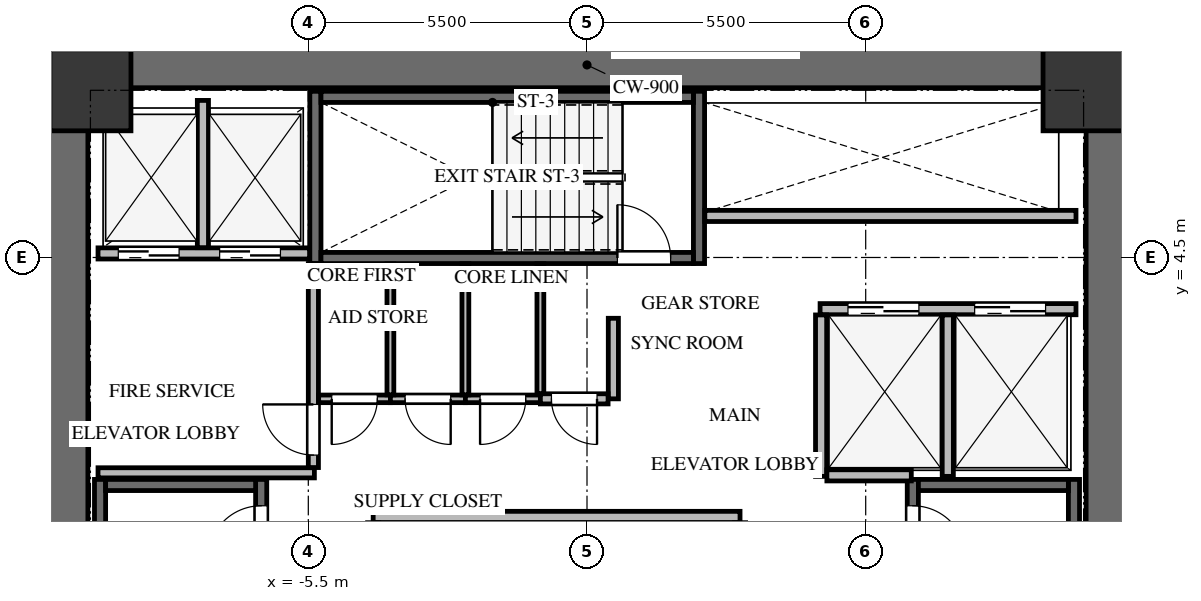
"""IFC4 building model, lengths in metres.
Left out: names, types, materials, properties, quantities, classifications, styles, units other than length and angle.
Written with IfcOpenShell. Run it as: python <this file> out.ifc"""

import sys

from ifc_helpers import new_model, si_unit, direction, frame, frame_2d, origin, origin_2d, place, context, subcontext, project, spatial, rectangle, extrude, source, transform, mapped, element, fill, save


model = new_model("IFC4")
c1 = context("Model", 3, precision=1e-05, world=origin(), true_north=direction((0.0, 1.0)))
c2 = subcontext(c1, "Body", "Model", "MODEL_VIEW")
j1 = project(units=[si_unit("LENGTHUNIT", "METRE"), si_unit("PLANEANGLEUNIT", "RADIAN")], contexts=[c1])
p1 = place(None, origin())
s1 = spatial("IfcSite", under=j1, at=p1, CompositionType="ELEMENT")
p2 = place(p1, origin())
s2 = spatial("IfcBuilding", under=s1, at=p2, CompositionType="ELEMENT")
p3 = place(p2, frame((0.0, 0.0, 68.7)))
s3 = spatial("IfcBuildingStorey", under=s2, at=p3, CompositionType="ELEMENT", Elevation=68.7)
for number, where, z_axis, x_axis in (
    (1, (-10.3, -8.75, 0.0), (0.0, 0.0, 1.0), (0.0, 1.0, 0.0)),
    (2, (10.3, -8.75, 0.0), (0.0, 0.0, 1.0), (0.0, 1.0, 0.0)),
):
    element("IfcWall", number, at=place(p3, frame(where, z_axis=z_axis, x_axis=x_axis)), inside=s3, PredefinedType="SHEAR", context=c2, shape_type="SweptSolid", body=[
        extrude(rectangle(XDim=17.5, YDim=0.9, at=frame_2d((8.75, 0.0))), origin(), (0.0, 0.0, 1.0), 3.3),
    ])
p4 = place(p3, frame((-9.85, 8.3, 0.0), z_axis=(0.0, 0.0, 1.0), x_axis=(1.0, 0.0, 0.0)))
e3 = element("IfcWall", 3, at=p4, inside=s3, PredefinedType="SHEAR", context=c2, shape_type="SweptSolid", body=[
    extrude(rectangle(XDim=19.7, YDim=0.9, at=frame_2d((9.85, 0.0))), origin(), (0.0, 0.0, 1.0), 3.3),
])
p5 = place(p3, frame((-6.43, -7.77, -0.24), z_axis=(0.0, 0.0, 1.0), x_axis=(0.0, 1.0, 0.0)))
e4 = element("IfcWall", 4, at=p5, inside=s3, PredefinedType="SHEAR", context=c2, shape_type="SweptSolid", body=[
    extrude(rectangle(XDim=7.89, YDim=0.22, at=frame_2d((3.945, 0.0))), origin(), (0.0, 0.0, 1.0), 3.3),
])
p6 = place(p5, frame((6.32, 0.0, 0.0)))
e5 = element("IfcOpeningElement", 5, at=p6, cuts=e4, PredefinedType="OPENING", context=c2, shape_type="SweptSolid", body=[
    extrude(rectangle(XDim=1.05, YDim=2.15, at=frame_2d((0.525, 1.075))), frame((0.0, 0.12, 0.0), z_axis=(0.0, -1.0, 0.0), x_axis=(1.0, 0.0, 0.0)), (0.0, 0.0, 1.0), 0.24),
])
p7 = place(p3, frame((-9.61, 0.12, -0.24), z_axis=(0.0, 0.0, 1.0), x_axis=(0.0, -1.0, 0.0)))
e6 = element("IfcWall", 6, at=p7, inside=s3, PredefinedType="SHEAR", context=c2, shape_type="SweptSolid", body=[
    extrude(rectangle(XDim=7.89, YDim=0.22, at=frame_2d((3.945, 0.0))), origin(), (0.0, 0.0, 1.0), 3.3),
])
p8 = place(p3, frame((-6.54, 0.01, -0.24), z_axis=(0.0, 0.0, 1.0), x_axis=(-1.0, 0.0, 0.0)))
e7 = element("IfcWall", 7, at=p8, inside=s3, PredefinedType="SHEAR", context=c2, shape_type="SweptSolid", body=[
    extrude(rectangle(XDim=2.96, YDim=0.22, at=frame_2d((1.48, 0.0))), origin(), (0.0, 0.0, 1.0), 3.3),
])
p9 = place(p3, frame((9.61, -7.77, -0.24), z_axis=(0.0, 0.0, 1.0), x_axis=(0.0, 1.0, 0.0)))
e8 = element("IfcWall", 8, at=p9, inside=s3, PredefinedType="SHEAR", context=c2, shape_type="SweptSolid", body=[
    extrude(rectangle(XDim=7.89, YDim=0.22, at=frame_2d((3.945, 0.0))), origin(), (0.0, 0.0, 1.0), 3.3),
])
p10 = place(p3, frame((6.43, 0.12, -0.24), z_axis=(0.0, 0.0, 1.0), x_axis=(0.0, -1.0, 0.0)))
e9 = element("IfcWall", 9, at=p10, inside=s3, PredefinedType="SHEAR", context=c2, shape_type="SweptSolid", body=[
    extrude(rectangle(XDim=7.89, YDim=0.22, at=frame_2d((3.945, 0.0))), origin(), (0.0, 0.0, 1.0), 3.3),
])
p11 = place(p10, frame((0.52, 0.0, 0.0)))
e10 = element("IfcOpeningElement", 10, at=p11, cuts=e9, PredefinedType="OPENING", context=c2, shape_type="SweptSolid", body=[
    extrude(rectangle(XDim=1.05, YDim=2.15, at=frame_2d((0.525, 1.075))), frame((0.0, 0.12, 0.0), z_axis=(0.0, -1.0, 0.0), x_axis=(1.0, 0.0, 0.0)), (0.0, 0.0, 1.0), 0.24),
])
p12 = place(p3, frame((9.5, 0.01, -0.24), z_axis=(0.0, 0.0, 1.0), x_axis=(-1.0, 0.0, 0.0)))
e11 = element("IfcWall", 11, at=p12, inside=s3, PredefinedType="SHEAR", context=c2, shape_type="SweptSolid", body=[
    extrude(rectangle(XDim=2.96, YDim=0.22, at=frame_2d((1.48, 0.0))), origin(), (0.0, 0.0, 1.0), 3.3),
])
for number, where, z_axis, x_axis in (
    (12, (2.21, 4.38, -0.24), (0.0, 0.0, 1.0), (0.0, 1.0, 0.0)),
    (13, (-5.36, 7.78, -0.24), (0.0, 0.0, 1.0), (0.0, -1.0, 0.0)),
):
    element("IfcWall", number, at=place(p3, frame(where, z_axis=z_axis, x_axis=x_axis)), inside=s3, PredefinedType="SHEAR", context=c2, shape_type="SweptSolid", body=[
        extrude(rectangle(XDim=3.4, YDim=0.22, at=frame_2d((1.7, 0.0))), origin(), (0.0, 0.0, 1.0), 3.3),
    ])
p13 = place(p3, frame((-5.25, 4.49, -0.24), z_axis=(0.0, 0.0, 1.0), x_axis=(1.0, 0.0, 0.0)))
e14 = element("IfcWall", 14, at=p13, inside=s3, PredefinedType="SHEAR", context=c2, shape_type="SweptSolid", body=[
    extrude(rectangle(XDim=7.35, YDim=0.22, at=frame_2d((3.675, 0.0))), origin(), (0.0, 0.0, 1.0), 3.3),
])
p14 = place(p13, frame((5.85, 0.0, 0.0)))
e15 = element("IfcOpeningElement", 15, at=p14, cuts=e14, PredefinedType="OPENING", context=c2, shape_type="SweptSolid", body=[
    extrude(rectangle(XDim=1.05, YDim=2.15, at=frame_2d((0.525, 1.075))), frame((0.0, 0.12, 0.0), z_axis=(0.0, -1.0, 0.0), x_axis=(1.0, 0.0, 0.0)), (0.0, 0.0, 1.0), 0.24),
])
p15 = place(p3, frame((2.1, 7.67, -0.24), z_axis=(0.0, 0.0, 1.0), x_axis=(-1.0, 0.0, 0.0)))
e16 = element("IfcWall", 16, at=p15, inside=s3, PredefinedType="SHEAR", context=c2, shape_type="SweptSolid", body=[
    extrude(rectangle(XDim=7.35, YDim=0.22, at=frame_2d((3.675, 0.0))), origin(), (0.0, 0.0, 1.0), 3.3),
])
m1 = source(origin(), c2, "Body", "SweptSolid", [
    extrude(rectangle(XDim=1.6, YDim=1.6, at=origin_2d()), origin(), (0.0, 0.0, 1.0), 3.3),
])
for number, where, z_axis, x_axis in (
    (17, (9.8, 7.8, -0.24), (0.0, 0.0, 1.0), (1.0, 0.0, 0.0)),
    (18, (-9.8, 7.8, -0.24), (0.0, 0.0, 1.0), (1.0, 0.0, 0.0)),
):
    element("IfcColumn", number, at=place(p3, frame(where, z_axis=z_axis, x_axis=x_axis)), inside=s3, PredefinedType="COLUMN", context=c2, shape_type="MappedRepresentation", body=[
        mapped(m1, transform((0.0, 0.0, 0.0), x_axis=(1.0, 0.0, 0.0), y_axis=(0.0, 1.0, 0.0), z_axis=(0.0, 0.0, 1.0), scale=1.0)),
    ])
p16 = place(p3, frame((-9.65, 4.58, 0.0), z_axis=(0.0, 0.0, 1.0), x_axis=(1.0, 0.0, 0.0)))
e19 = element("IfcWall", 19, at=p16, inside=s3, PredefinedType="SOLIDWALL", context=c2, shape_type="SweptSolid", body=[
    extrude(rectangle(XDim=4.175, YDim=0.22, at=frame_2d((2.087, 0.0))), origin(), (0.0, 0.0, 1.0), 3.045),
])
p17 = place(p16, frame((0.4, 0.0, 0.0)))
e20 = element("IfcOpeningElement", 20, at=p17, cuts=e19, PredefinedType="OPENING", context=c2, shape_type="SweptSolid", body=[
    extrude(rectangle(XDim=1.2, YDim=2.15, at=frame_2d((0.6, 1.075))), frame((0.0, 0.12, 0.0), z_axis=(0.0, -1.0, 0.0), x_axis=(1.0, 0.0, 0.0)), (0.0, 0.0, 1.0), 0.24),
])
p18 = place(p16, frame((2.4, 0.0, 0.0)))
e21 = element("IfcOpeningElement", 21, at=p18, cuts=e19, PredefinedType="OPENING", context=c2, shape_type="SweptSolid", body=[
    extrude(rectangle(XDim=1.2, YDim=2.15, at=frame_2d((0.6, 1.075))), frame((0.0, 0.12, 0.0), z_axis=(0.0, -1.0, 0.0), x_axis=(1.0, 0.0, 0.0)), (0.0, 0.0, 1.0), 0.24),
])
p19 = place(p3, frame((-7.58, 4.694, 0.0), z_axis=(0.0, 0.0, 1.0), x_axis=(0.0, 1.0, 0.0)))
e22 = element("IfcWall", 22, at=p19, inside=s3, PredefinedType="SOLIDWALL", context=c2, shape_type="SweptSolid", body=[
    extrude(rectangle(XDim=2.906, YDim=0.22, at=frame_2d((1.453, 0.0))), origin(), (0.0, 0.0, 1.0), 3.045),
])
p20 = place(p3, frame((-9.65, 0.25, 0.0), z_axis=(0.0, 0.0, 1.0), x_axis=(1.0, 0.0, 0.0)))
e23 = element("IfcWall", 23, at=p20, inside=s3, PredefinedType="SOLIDWALL", context=c2, shape_type="SweptSolid", body=[
    extrude(rectangle(XDim=4.27, YDim=0.2, at=frame_2d((2.135, 0.0))), origin(), (0.0, 0.0, 1.0), 3.045),
])
p21 = place(p3, frame((-5.4, 0.354, 0.0), z_axis=(0.0, 0.0, 1.0), x_axis=(0.0, 1.0, 0.0)))
e24 = element("IfcWall", 24, at=p21, inside=s3, PredefinedType="SOLIDWALL", context=c2, shape_type="SweptSolid", body=[
    extrude(rectangle(XDim=4.026, YDim=0.2, at=frame_2d((2.013, 0.0))), origin(), (0.0, 0.0, 1.0), 3.045),
])
p22 = place(p21, frame((0.246, 0.0, 0.0)))
e25 = element("IfcOpeningElement", 25, at=p22, cuts=e24, PredefinedType="OPENING", context=c2, shape_type="SweptSolid", body=[
    extrude(rectangle(XDim=1.0, YDim=2.15, at=frame_2d((0.5, 1.075))), frame((0.0, 0.11, 0.0), z_axis=(0.0, -1.0, 0.0), x_axis=(1.0, 0.0, 0.0)), (0.0, 0.0, 1.0), 0.22),
])
p23 = place(p3, frame((4.6, 3.48, 0.0), z_axis=(0.0, 0.0, 1.0), x_axis=(1.0, 0.0, 0.0)))
e26 = element("IfcWall", 26, at=p23, inside=s3, PredefinedType="SOLIDWALL", context=c2, shape_type="SweptSolid", body=[
    extrude(rectangle(XDim=5.05, YDim=0.22, at=frame_2d((2.525, 0.0))), origin(), (0.0, 0.0, 1.0), 3.045),
])
p24 = place(p23, frame((0.55, 0.0, 0.0)))
e27 = element("IfcOpeningElement", 27, at=p24, cuts=e26, PredefinedType="OPENING", context=c2, shape_type="SweptSolid", body=[
    extrude(rectangle(XDim=1.4, YDim=2.15, at=frame_2d((0.7, 1.075))), frame((0.0, 0.12, 0.0), z_axis=(0.0, -1.0, 0.0), x_axis=(1.0, 0.0, 0.0)), (0.0, 0.0, 1.0), 0.24),
])
p25 = place(p23, frame((3.05, 0.0, 0.0)))
e28 = element("IfcOpeningElement", 28, at=p25, cuts=e26, PredefinedType="OPENING", context=c2, shape_type="SweptSolid", body=[
    extrude(rectangle(XDim=1.4, YDim=2.15, at=frame_2d((0.7, 1.075))), frame((0.0, 0.12, 0.0), z_axis=(0.0, -1.0, 0.0), x_axis=(1.0, 0.0, 0.0)), (0.0, 0.0, 1.0), 0.24),
])
for number, where, z_axis, x_axis in (
    (29, (4.62, 0.18, 0.0), (0.0, 0.0, 1.0), (0.0, 1.0, 0.0)),
    (30, (7.12, 0.18, 0.0), (0.0, 0.0, 1.0), (0.0, 1.0, 0.0)),
):
    element("IfcWall", number, at=place(p3, frame(where, z_axis=z_axis, x_axis=x_axis)), inside=s3, PredefinedType="SOLIDWALL", context=c2, shape_type="SweptSolid", body=[
        extrude(rectangle(XDim=3.186, YDim=0.22, at=frame_2d((1.593, 0.0))), origin(), (0.0, 0.0, 1.0), 3.045),
    ])
p26 = place(p3, frame((4.734, 0.2, 0.0), z_axis=(0.0, 0.0, 1.0), x_axis=(1.0, 0.0, 0.0)))
e31 = element("IfcWall", 31, at=p26, inside=s3, PredefinedType="SOLIDWALL", context=c2, shape_type="SweptSolid", body=[
    extrude(rectangle(XDim=1.666, YDim=0.22, at=frame_2d((0.833, 0.0))), origin(), (0.0, 0.0, 1.0), 3.045),
])
p27 = place(p3, frame((-4.22, -0.62, 0.0), z_axis=(0.0, 0.0, 1.0), x_axis=(1.0, 0.0, 0.0)))
e32 = element("IfcWall", 32, at=p27, inside=s3, PredefinedType="SOLIDWALL", context=c2, shape_type="SweptSolid", body=[
    extrude(rectangle(XDim=7.24, YDim=0.22, at=frame_2d((3.62, 0.0))), origin(), (0.0, 0.0, 1.0), 3.045),
])
p28 = place(p3, frame((2.325, 5.32, 0.0), z_axis=(0.0, 0.0, 1.0), x_axis=(1.0, 0.0, 0.0)))
e33 = element("IfcWall", 33, at=p28, inside=s3, PredefinedType="SOLIDWALL", context=c2, shape_type="SweptSolid", body=[
    extrude(rectangle(XDim=7.325, YDim=0.22, at=frame_2d((3.663, 0.0))), origin(), (0.0, 0.0, 1.0), 3.045),
])
p29 = place(p3, frame((-3.88, 1.71, 0.0), z_axis=(0.0, 0.0, 1.0), x_axis=(-1.0, 0.0, 0.0)))
e34 = element("IfcWall", 34, at=p29, inside=s3, PredefinedType="PARTITIONING", context=c2, shape_type="SweptSolid", body=[
    extrude(rectangle(XDim=1.416, YDim=0.15, at=frame_2d((0.708, 0.0))), origin(), (0.0, 0.0, 1.0), 3.045),
])
p30 = place(p29, frame((0.258, 0.0, 0.0)))
e35 = element("IfcOpeningElement", 35, at=p30, cuts=e34, PredefinedType="OPENING", context=c2, shape_type="SweptSolid", body=[
    extrude(rectangle(XDim=0.9, YDim=2.05, at=frame_2d((0.45, 1.025))), frame((0.0, 0.085, 0.0), z_axis=(0.0, -1.0, 0.0), x_axis=(1.0, 0.0, 0.0)), (0.0, 0.0, 1.0), 0.17),
])
p31 = place(p3, frame((-2.4, 1.71, 0.0), z_axis=(0.0, 0.0, 1.0), x_axis=(-1.0, 0.0, 0.0)))
e36 = element("IfcWall", 36, at=p31, inside=s3, PredefinedType="PARTITIONING", context=c2, shape_type="SweptSolid", body=[
    extrude(rectangle(XDim=1.48, YDim=0.15, at=frame_2d((0.74, 0.0))), origin(), (0.0, 0.0, 1.0), 3.045),
])
p32 = place(p31, frame((0.29, 0.0, 0.0)))
e37 = element("IfcOpeningElement", 37, at=p32, cuts=e36, PredefinedType="OPENING", context=c2, shape_type="SweptSolid", body=[
    extrude(rectangle(XDim=0.9, YDim=2.05, at=frame_2d((0.45, 1.025))), frame((0.0, 0.085, 0.0), z_axis=(0.0, -1.0, 0.0), x_axis=(1.0, 0.0, 0.0)), (0.0, 0.0, 1.0), 0.17),
])
p33 = place(p3, frame((-0.92, 1.71, 0.0), z_axis=(0.0, 0.0, 1.0), x_axis=(-1.0, 0.0, 0.0)))
e38 = element("IfcWall", 38, at=p33, inside=s3, PredefinedType="PARTITIONING", context=c2, shape_type="SweptSolid", body=[
    extrude(rectangle(XDim=1.48, YDim=0.15, at=frame_2d((0.74, 0.0))), origin(), (0.0, 0.0, 1.0), 3.045),
])
p34 = place(p33, frame((0.29, 0.0, 0.0)))
e39 = element("IfcOpeningElement", 39, at=p34, cuts=e38, PredefinedType="OPENING", context=c2, shape_type="SweptSolid", body=[
    extrude(rectangle(XDim=0.9, YDim=2.05, at=frame_2d((0.45, 1.025))), frame((0.0, 0.085, 0.0), z_axis=(0.0, -1.0, 0.0), x_axis=(1.0, 0.0, 0.0)), (0.0, 0.0, 1.0), 0.17),
])
p35 = place(p3, frame((0.52, 3.3, 0.0), z_axis=(0.0, 0.0, 1.0), x_axis=(0.0, -1.0, 0.0)))
e40 = element("IfcWall", 40, at=p35, inside=s3, PredefinedType="SOLIDWALL", context=c2, shape_type="SweptSolid", body=[
    extrude(rectangle(XDim=1.59, YDim=0.2, at=frame_2d((0.795, 0.0))), origin(), (0.0, 0.0, 1.0), 3.045),
])
p36 = place(p3, frame((0.416, 1.71, 0.0), z_axis=(0.0, 0.0, 1.0), x_axis=(-1.0, 0.0, 0.0)))
e41 = element("IfcWall", 41, at=p36, inside=s3, PredefinedType="SOLIDWALL", context=c2, shape_type="SweptSolid", body=[
    extrude(rectangle(XDim=1.336, YDim=0.2, at=frame_2d((0.668, 0.0))), origin(), (0.0, 0.0, 1.0), 3.045),
])
p37 = place(p36, frame((0.218, 0.0, 0.0)))
e42 = element("IfcOpeningElement", 42, at=p37, cuts=e41, PredefinedType="OPENING", context=c2, shape_type="SweptSolid", body=[
    extrude(rectangle(XDim=0.9, YDim=2.05, at=frame_2d((0.45, 1.025))), frame((0.0, 0.11, 0.0), z_axis=(0.0, -1.0, 0.0), x_axis=(1.0, 0.0, 0.0)), (0.0, 0.0, 1.0), 0.22),
])
for number, where, z_axis, x_axis in (
    (43, (-3.88, 4.375, 0.0), (0.0, 0.0, 1.0), (0.0, -1.0, 0.0)),
    (44, (-2.4, 4.375, 0.0), (0.0, 0.0, 1.0), (0.0, -1.0, 0.0)),
):
    element("IfcWall", number, at=place(p3, frame(where, z_axis=z_axis, x_axis=x_axis)), inside=s3, PredefinedType="PARTITIONING", context=c2, shape_type="SweptSolid", body=[
        extrude(rectangle(XDim=2.586, YDim=0.135, at=frame_2d((1.293, 0.0))), origin(), (0.0, 0.0, 1.0), 3.045),
    ])
p38 = place(p3, frame((-0.92, 4.375, 0.0), z_axis=(0.0, 0.0, 1.0), x_axis=(0.0, -1.0, 0.0)))
e45 = element("IfcWall", 45, at=p38, inside=s3, PredefinedType="PARTITIONING", context=c2, shape_type="SweptSolid", body=[
    extrude(rectangle(XDim=2.561, YDim=0.135, at=frame_2d((1.281, 0.0))), origin(), (0.0, 0.0, 1.0), 3.045),
])
m2 = source(origin(), c2, "Body", "SweptSolid", [
    extrude(rectangle(XDim=1.05, YDim=2.15, at=frame_2d((0.525, 1.075))), frame((0.0, 0.025, 0.0), z_axis=(0.0, -1.0, 0.0), x_axis=(1.0, 0.0, 0.0)), (0.0, 0.0, 1.0), 0.05),
])
p39 = place(p6, origin())
e46 = element("IfcDoor", 46, at=p39, inside=s3, OperationType="SINGLE_SWING_LEFT", PredefinedType="DOOR", context=c2, shape_type="MappedRepresentation", body=[
    mapped(m2, transform((0.0, 0.0, 0.0), x_axis=(1.0, 0.0, 0.0), y_axis=(0.0, 1.0, 0.0), z_axis=(0.0, 0.0, 1.0), scale=1.0)),
])
fill(e5, e46)
m3 = source(origin(), c2, "Body", "SweptSolid", [
    extrude(rectangle(XDim=1.05, YDim=2.15, at=frame_2d((0.525, 1.075))), frame((0.0, 0.025, 0.0), z_axis=(0.0, -1.0, 0.0), x_axis=(1.0, 0.0, 0.0)), (0.0, 0.0, 1.0), 0.05),
])
p40 = place(p11, origin())
e47 = element("IfcDoor", 47, at=p40, inside=s3, OperationType="SINGLE_SWING_RIGHT", PredefinedType="DOOR", context=c2, shape_type="MappedRepresentation", body=[
    mapped(m3, transform((0.0, 0.0, 0.0), x_axis=(1.0, 0.0, 0.0), y_axis=(0.0, 1.0, 0.0), z_axis=(0.0, 0.0, 1.0), scale=1.0)),
])
fill(e10, e47)
p41 = place(p14, origin())
e48 = element("IfcDoor", 48, at=p41, inside=s3, OperationType="SINGLE_SWING_LEFT", PredefinedType="DOOR", context=c2, shape_type="MappedRepresentation", body=[
    mapped(m2, transform((0.0, 0.0, 0.0), x_axis=(1.0, 0.0, 0.0), y_axis=(0.0, 1.0, 0.0), z_axis=(0.0, 0.0, 1.0), scale=1.0)),
])
fill(e15, e48)
m4 = source(origin(), c2, "Body", "SweptSolid", [
    extrude(rectangle(XDim=1.2, YDim=2.15, at=frame_2d((0.6, 1.075))), frame((0.0, 0.025, 0.0), z_axis=(0.0, -1.0, 0.0), x_axis=(1.0, 0.0, 0.0)), (0.0, 0.0, 1.0), 0.05),
])
p42 = place(p17, origin())
e49 = element("IfcDoor", 49, at=p42, inside=s3, OperationType="DOUBLE_DOOR_SLIDING", PredefinedType="DOOR", context=c2, shape_type="MappedRepresentation", body=[
    mapped(m4, transform((0.0, 0.0, 0.0), x_axis=(1.0, 0.0, 0.0), y_axis=(0.0, 1.0, 0.0), z_axis=(0.0, 0.0, 1.0), scale=1.0)),
])
fill(e20, e49)
p43 = place(p18, origin())
e50 = element("IfcDoor", 50, at=p43, inside=s3, OperationType="DOUBLE_DOOR_SLIDING", PredefinedType="DOOR", context=c2, shape_type="MappedRepresentation", body=[
    mapped(m4, transform((0.0, 0.0, 0.0), x_axis=(1.0, 0.0, 0.0), y_axis=(0.0, 1.0, 0.0), z_axis=(0.0, 0.0, 1.0), scale=1.0)),
])
fill(e21, e50)
m5 = source(origin(), c2, "Body", "SweptSolid", [
    extrude(rectangle(XDim=1.0, YDim=2.15, at=frame_2d((0.5, 1.075))), frame((0.0, 0.025, 0.0), z_axis=(0.0, -1.0, 0.0), x_axis=(1.0, 0.0, 0.0)), (0.0, 0.0, 1.0), 0.05),
])
p44 = place(p22, origin())
e51 = element("IfcDoor", 51, at=p44, inside=s3, OperationType="SINGLE_SWING_RIGHT", PredefinedType="DOOR", context=c2, shape_type="MappedRepresentation", body=[
    mapped(m5, transform((0.0, 0.0, 0.0), x_axis=(1.0, 0.0, 0.0), y_axis=(0.0, 1.0, 0.0), z_axis=(0.0, 0.0, 1.0), scale=1.0)),
])
fill(e25, e51)
m6 = source(origin(), c2, "Body", "SweptSolid", [
    extrude(rectangle(XDim=1.4, YDim=2.15, at=frame_2d((0.7, 1.075))), frame((0.0, 0.025, 0.0), z_axis=(0.0, -1.0, 0.0), x_axis=(1.0, 0.0, 0.0)), (0.0, 0.0, 1.0), 0.05),
])
p45 = place(p24, origin())
e52 = element("IfcDoor", 52, at=p45, inside=s3, OperationType="DOUBLE_DOOR_SLIDING", PredefinedType="DOOR", context=c2, shape_type="MappedRepresentation", body=[
    mapped(m6, transform((0.0, 0.0, 0.0), x_axis=(1.0, 0.0, 0.0), y_axis=(0.0, 1.0, 0.0), z_axis=(0.0, 0.0, 1.0), scale=1.0)),
])
fill(e27, e52)
p46 = place(p25, origin())
e53 = element("IfcDoor", 53, at=p46, inside=s3, OperationType="DOUBLE_DOOR_SLIDING", PredefinedType="DOOR", context=c2, shape_type="MappedRepresentation", body=[
    mapped(m6, transform((0.0, 0.0, 0.0), x_axis=(1.0, 0.0, 0.0), y_axis=(0.0, 1.0, 0.0), z_axis=(0.0, 0.0, 1.0), scale=1.0)),
])
fill(e28, e53)
m7 = source(origin(), c2, "Body", "SweptSolid", [
    extrude(rectangle(XDim=0.9, YDim=2.05, at=frame_2d((0.45, 1.025))), frame((0.0, 0.025, 0.0), z_axis=(0.0, -1.0, 0.0), x_axis=(1.0, 0.0, 0.0)), (0.0, 0.0, 1.0), 0.05),
])
p47 = place(p30, origin())
e54 = element("IfcDoor", 54, at=p47, inside=s3, OperationType="SINGLE_SWING_RIGHT", PredefinedType="DOOR", context=c2, shape_type="MappedRepresentation", body=[
    mapped(m7, transform((0.0, 0.0, 0.0), x_axis=(1.0, 0.0, 0.0), y_axis=(0.0, 1.0, 0.0), z_axis=(0.0, 0.0, 1.0), scale=1.0)),
])
fill(e35, e54)
m8 = source(origin(), c2, "Body", "SweptSolid", [
    extrude(rectangle(XDim=0.9, YDim=2.05, at=frame_2d((0.45, 1.025))), frame((0.0, 0.025, 0.0), z_axis=(0.0, -1.0, 0.0), x_axis=(1.0, 0.0, 0.0)), (0.0, 0.0, 1.0), 0.05),
])
p48 = place(p32, origin())
e55 = element("IfcDoor", 55, at=p48, inside=s3, OperationType="SINGLE_SWING_LEFT", PredefinedType="DOOR", context=c2, shape_type="MappedRepresentation", body=[
    mapped(m8, transform((0.0, 0.0, 0.0), x_axis=(1.0, 0.0, 0.0), y_axis=(0.0, 1.0, 0.0), z_axis=(0.0, 0.0, 1.0), scale=1.0)),
])
fill(e37, e55)
p49 = place(p34, origin())
e56 = element("IfcDoor", 56, at=p49, inside=s3, OperationType="SINGLE_SWING_RIGHT", PredefinedType="DOOR", context=c2, shape_type="MappedRepresentation", body=[
    mapped(m7, transform((0.0, 0.0, 0.0), x_axis=(1.0, 0.0, 0.0), y_axis=(0.0, 1.0, 0.0), z_axis=(0.0, 0.0, 1.0), scale=1.0)),
])
fill(e39, e56)
p50 = place(p37, origin())
e57 = element("IfcDoor", 57, at=p50, inside=s3, OperationType="SINGLE_SWING_LEFT", PredefinedType="DOOR", context=c2, shape_type="MappedRepresentation", body=[
    mapped(m8, transform((0.0, 0.0, 0.0), x_axis=(1.0, 0.0, 0.0), y_axis=(0.0, 1.0, 0.0), z_axis=(0.0, 0.0, 1.0), scale=1.0)),
])
fill(e42, e57)
save(model, sys.argv[1])
